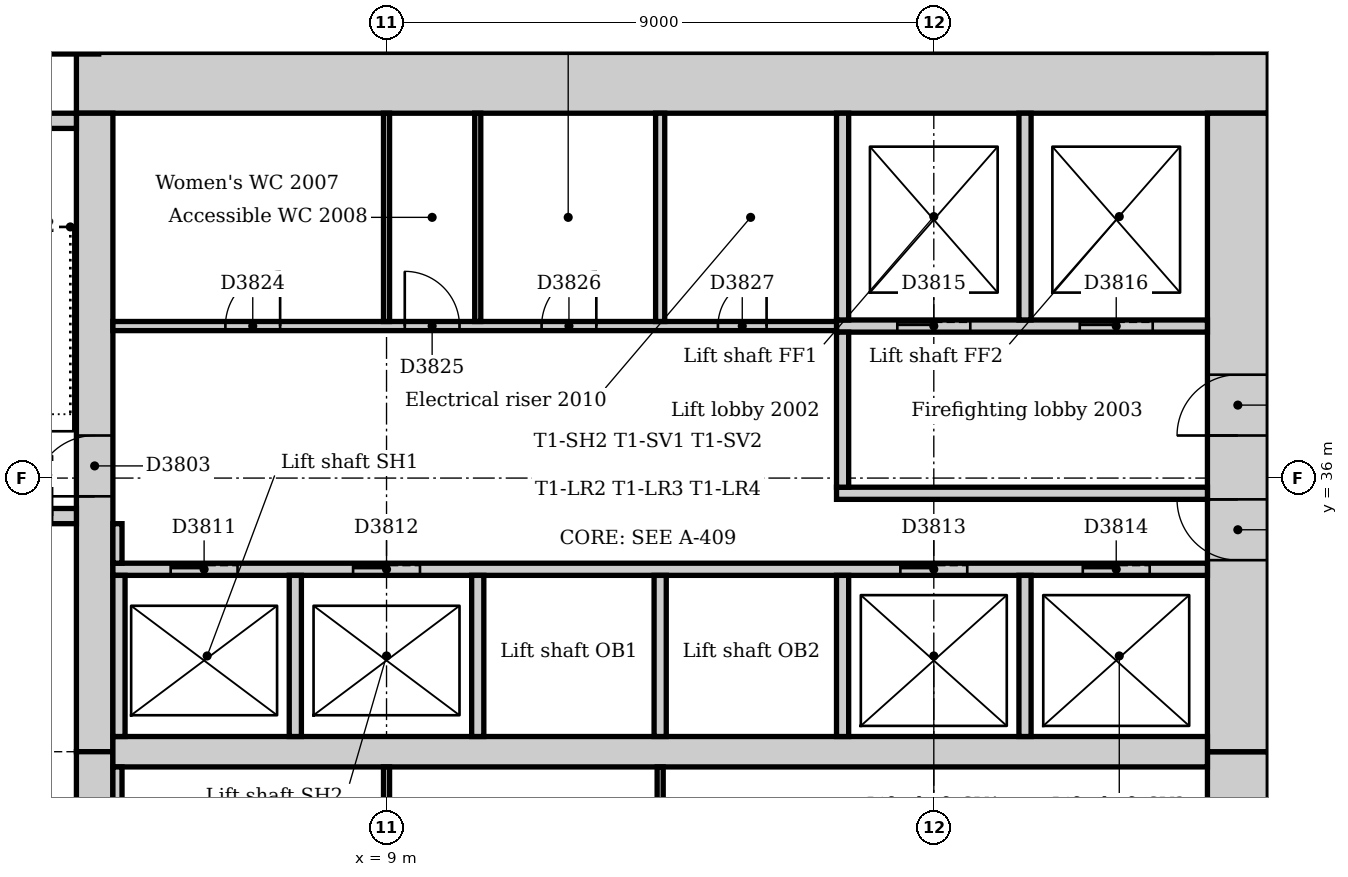
"""IFC4 building model, lengths in metres.
Left out: names, types, materials, properties, quantities, classifications, styles, units other than length and angle.
Written with IfcOpenShell. Run it as: python <this file> out.ifc"""

import sys

from ifc_helpers import new_model, si_unit, direction, frame, frame_2d, origin, origin_2d, place, context, subcontext, project, spatial, rectangle, extrude, element, fill, save


model = new_model("IFC4")
c1 = context("Model", 3, precision=1e-05, world=origin(), true_north=direction((0.0, 1.0)))
c2 = subcontext(c1, "Body", "Model", "MODEL_VIEW")
j1 = project(units=[si_unit("LENGTHUNIT", "METRE"), si_unit("PLANEANGLEUNIT", "RADIAN")], contexts=[c1])
p1 = place(None, origin())
s1 = spatial("IfcSite", under=j1, at=p1, CompositionType="ELEMENT")
p2 = place(p1, origin())
s2 = spatial("IfcBuilding", under=s1, at=p2, CompositionType="ELEMENT")
p3 = place(p2, frame((0.0, 0.0, 87.0)))
s3 = spatial("IfcBuildingStorey", under=s2, at=p3, CompositionType="ELEMENT", Elevation=87.0)
p4 = place(p3, frame((23.5, 42.5, 0.0), z_axis=(0.0, 0.0, 1.0), x_axis=(-1.0, 0.0, 0.0)))
e1 = element("IfcWall", 1, at=p4, inside=s3, PredefinedType="SOLIDWALL", context=c2, shape_type="SweptSolid", body=[
    extrude(rectangle(XDim=19.6, YDim=1.0, at=frame_2d((9.8, 0.0))), origin(), (0.0, 0.0, 1.0), 4.0),
])
p5 = place(p3, frame((23.0, 21.0, 0.0), z_axis=(0.0, 0.0, 1.0), x_axis=(0.0, 1.0, 0.0)))
e2 = element("IfcWall", 2, at=p5, inside=s3, PredefinedType="SOLIDWALL", context=c2, shape_type="SweptSolid", body=[
    extrude(rectangle(XDim=10.5, YDim=1.0, at=frame_2d((5.25, 0.0))), origin(), (0.0, 0.0, 1.0), 4.0),
])
p6 = place(p5, frame((4.35, 0.0, 0.0)))
e3 = element("IfcOpeningElement", 3, at=p6, cuts=e2, PredefinedType="OPENING", context=c2, shape_type="SweptSolid", body=[
    extrude(rectangle(XDim=1.8, YDim=2.1, at=frame_2d((0.9, 1.05))), frame((0.0, 0.51, 0.0), z_axis=(0.0, -1.0, 0.0), x_axis=(1.0, 0.0, 0.0)), (0.0, 0.0, 1.0), 1.02),
])
p7 = place(p3, frame((23.0, 31.5, 0.0), z_axis=(0.0, 0.0, 1.0), x_axis=(0.0, 1.0, 0.0)))
e4 = element("IfcWall", 4, at=p7, inside=s3, PredefinedType="SOLIDWALL", context=c2, shape_type="SweptSolid", body=[
    extrude(rectangle(XDim=10.5, YDim=1.0, at=frame_2d((5.25, 0.0))), origin(), (0.0, 0.0, 1.0), 4.0),
])
p8 = place(p7, frame((3.15, 0.0, 0.0)))
e5 = element("IfcOpeningElement", 5, at=p8, cuts=e4, PredefinedType="OPENING", context=c2, shape_type="SweptSolid", body=[
    extrude(rectangle(XDim=1.0, YDim=2.1, at=frame_2d((0.5, 1.05))), frame((0.0, 0.51, 0.0), z_axis=(0.0, -1.0, 0.0), x_axis=(1.0, 0.0, 0.0)), (0.0, 0.0, 1.0), 1.02),
])
p9 = place(p7, frame((5.2, 0.0, 0.0)))
e6 = element("IfcOpeningElement", 6, at=p9, cuts=e4, PredefinedType="OPENING", context=c2, shape_type="SweptSolid", body=[
    extrude(rectangle(XDim=1.0, YDim=2.1, at=frame_2d((0.5, 1.05))), frame((0.0, 0.51, 0.0), z_axis=(0.0, -1.0, 0.0), x_axis=(1.0, 0.0, 0.0)), (0.0, 0.0, 1.0), 1.02),
])
p10 = place(p3, frame((4.2, 42.0, 0.0), z_axis=(0.0, 0.0, 1.0), x_axis=(0.0, -1.0, 0.0)))
e7 = element("IfcWall", 7, at=p10, inside=s3, PredefinedType="SOLIDWALL", context=c2, shape_type="SweptSolid", body=[
    extrude(rectangle(XDim=10.5, YDim=0.6, at=frame_2d((5.25, 0.0))), origin(), (0.0, 0.0, 1.0), 4.0),
])
p11 = place(p10, frame((5.3, 0.0, 0.0)))
e8 = element("IfcOpeningElement", 8, at=p11, cuts=e7, PredefinedType="OPENING", context=c2, shape_type="SweptSolid", body=[
    extrude(rectangle(XDim=1.0, YDim=2.1, at=frame_2d((0.5, 1.05))), frame((0.0, 0.31, 0.0), z_axis=(0.0, -1.0, 0.0), x_axis=(1.0, 0.0, 0.0)), (0.0, 0.0, 1.0), 0.62),
])
p12 = place(p3, frame((4.2, 31.5, 0.0), z_axis=(0.0, 0.0, 1.0), x_axis=(0.0, -1.0, 0.0)))
e9 = element("IfcWall", 9, at=p12, inside=s3, PredefinedType="SOLIDWALL", context=c2, shape_type="SweptSolid", body=[
    extrude(rectangle(XDim=10.5, YDim=0.6, at=frame_2d((5.25, 0.0))), origin(), (0.0, 0.0, 1.0), 4.0),
])
p13 = place(p12, frame((4.25, 0.0, 0.0)))
e10 = element("IfcOpeningElement", 10, at=p13, cuts=e9, PredefinedType="OPENING", context=c2, shape_type="SweptSolid", body=[
    extrude(rectangle(XDim=1.0, YDim=2.1, at=frame_2d((0.5, 1.05))), frame((0.0, 0.31, 0.0), z_axis=(0.0, -1.0, 0.0), x_axis=(1.0, 0.0, 0.0)), (0.0, 0.0, 1.0), 0.62),
])
p14 = place(p3, frame((4.5, 31.5, 0.0), z_axis=(0.0, 0.0, 1.0), x_axis=(1.0, 0.0, 0.0)))
e11 = element("IfcWall", 11, at=p14, inside=s3, PredefinedType="SOLIDWALL", context=c2, shape_type="SweptSolid", body=[
    extrude(rectangle(XDim=18.0, YDim=0.5, at=frame_2d((9.0, 0.0))), origin(), (0.0, 0.0, 1.0), 4.0),
])
p15 = place(p3, frame((0.36, 35.375, 0.0), z_axis=(0.0, 0.0, 1.0), x_axis=(1.0, 0.0, 0.0)))
e12 = element("IfcWall", 12, at=p15, inside=s3, PredefinedType="SOLIDWALL", context=c2, shape_type="SweptSolid", body=[
    extrude(rectangle(XDim=3.54, YDim=0.25, at=frame_2d((1.77, 0.0))), origin(), (0.0, 0.0, 1.0), 4.0),
])
p16 = place(p15, frame((2.14, 0.0, 0.0)))
e13 = element("IfcOpeningElement", 13, at=p16, cuts=e12, PredefinedType="OPENING", context=c2, shape_type="SweptSolid", body=[
    extrude(rectangle(XDim=1.0, YDim=2.1, at=frame_2d((0.5, 1.05))), frame((0.0, 0.135, 0.0), z_axis=(0.0, -1.0, 0.0), x_axis=(1.0, 0.0, 0.0)), (0.0, 0.0, 1.0), 0.27),
])
p17 = place(p3, frame((3.9, 41.875, 0.0), z_axis=(0.0, 0.0, 1.0), x_axis=(-1.0, 0.0, 0.0)))
e14 = element("IfcWall", 14, at=p17, inside=s3, PredefinedType="SOLIDWALL", context=c2, shape_type="SweptSolid", body=[
    extrude(rectangle(XDim=3.54, YDim=0.25, at=frame_2d((1.77, 0.0))), origin(), (0.0, 0.0, 1.0), 4.0),
])
p18 = place(p3, frame((3.667, 43.574, 0.0), z_axis=(0.0, 0.0, 1.0), x_axis=(1.0, 0.0, 0.0)))
e15 = element("IfcColumn", 15, at=p18, inside=s3, PredefinedType="COLUMN", context=c2, shape_type="SweptSolid", body=[
    extrude(rectangle(XDim=1.2, YDim=1.2, at=origin_2d()), origin(), (0.0, 0.0, 1.0), 3.85),
])
p19 = place(p3, frame((16.4, 35.75, 0.0), z_axis=(0.0, 0.0, 1.0), x_axis=(1.0, 0.0, 0.0)))
e16 = element("IfcWall", 16, at=p19, inside=s3, PredefinedType="PARTITIONING", context=c2, shape_type="SweptSolid", body=[
    extrude(rectangle(XDim=6.1, YDim=0.2, at=frame_2d((3.05, 0.0))), origin(), (0.0, 0.0, 1.0), 3.85),
])
p20 = place(p3, frame((16.4, 38.5, 0.0), z_axis=(0.0, 0.0, 1.0), x_axis=(1.0, 0.0, 0.0)))
e17 = element("IfcWall", 17, at=p20, inside=s3, PredefinedType="PARTITIONING", context=c2, shape_type="SweptSolid", body=[
    extrude(rectangle(XDim=6.1, YDim=0.2, at=frame_2d((3.05, 0.0))), origin(), (0.0, 0.0, 1.0), 3.85),
])
p21 = place(p20, frame((1.0, 0.0, 0.0)))
e18 = element("IfcOpeningElement", 18, at=p21, cuts=e17, PredefinedType="OPENING", context=c2, shape_type="SweptSolid", body=[
    extrude(rectangle(XDim=1.2, YDim=2.1, at=frame_2d((0.6, 1.05))), frame((0.0, 0.11, 0.0), z_axis=(0.0, -1.0, 0.0), x_axis=(1.0, 0.0, 0.0)), (0.0, 0.0, 1.0), 0.22),
])
p22 = place(p20, frame((4.0, 0.0, 0.0)))
e19 = element("IfcOpeningElement", 19, at=p22, cuts=e17, PredefinedType="OPENING", context=c2, shape_type="SweptSolid", body=[
    extrude(rectangle(XDim=1.2, YDim=2.1, at=frame_2d((0.6, 1.05))), frame((0.0, 0.11, 0.0), z_axis=(0.0, -1.0, 0.0), x_axis=(1.0, 0.0, 0.0)), (0.0, 0.0, 1.0), 0.22),
])
p23 = place(p3, frame((16.5, 35.85, 0.0), z_axis=(0.0, 0.0, 1.0), x_axis=(0.0, 1.0, 0.0)))
e20 = element("IfcWall", 20, at=p23, inside=s3, PredefinedType="PARTITIONING", context=c2, shape_type="SweptSolid", body=[
    extrude(rectangle(XDim=2.55, YDim=0.2, at=frame_2d((1.275, 0.0))), origin(), (0.0, 0.0, 1.0), 3.85),
])
p24 = place(p3, frame((4.5, 34.5, 0.0), z_axis=(0.0, 0.0, 1.0), x_axis=(1.0, 0.0, 0.0)))
e21 = element("IfcWall", 21, at=p24, inside=s3, PredefinedType="PARTITIONING", context=c2, shape_type="SweptSolid", body=[
    extrude(rectangle(XDim=18.0, YDim=0.2, at=frame_2d((9.0, 0.0))), origin(), (0.0, 0.0, 1.0), 3.85),
])
p25 = place(p24, frame((0.95, 0.0, 0.0)))
e22 = element("IfcOpeningElement", 22, at=p25, cuts=e21, PredefinedType="OPENING", context=c2, shape_type="SweptSolid", body=[
    extrude(rectangle(XDim=1.1, YDim=2.1, at=frame_2d((0.55, 1.05))), frame((0.0, 0.11, 0.0), z_axis=(0.0, -1.0, 0.0), x_axis=(1.0, 0.0, 0.0)), (0.0, 0.0, 1.0), 0.22),
])
p26 = place(p24, frame((3.95, 0.0, 0.0)))
e23 = element("IfcOpeningElement", 23, at=p26, cuts=e21, PredefinedType="OPENING", context=c2, shape_type="SweptSolid", body=[
    extrude(rectangle(XDim=1.1, YDim=2.1, at=frame_2d((0.55, 1.05))), frame((0.0, 0.11, 0.0), z_axis=(0.0, -1.0, 0.0), x_axis=(1.0, 0.0, 0.0)), (0.0, 0.0, 1.0), 0.22),
])
p27 = place(p24, frame((12.95, 0.0, 0.0)))
e24 = element("IfcOpeningElement", 24, at=p27, cuts=e21, PredefinedType="OPENING", context=c2, shape_type="SweptSolid", body=[
    extrude(rectangle(XDim=1.1, YDim=2.1, at=frame_2d((0.55, 1.05))), frame((0.0, 0.11, 0.0), z_axis=(0.0, -1.0, 0.0), x_axis=(1.0, 0.0, 0.0)), (0.0, 0.0, 1.0), 0.22),
])
p28 = place(p24, frame((15.95, 0.0, 0.0)))
e25 = element("IfcOpeningElement", 25, at=p28, cuts=e21, PredefinedType="OPENING", context=c2, shape_type="SweptSolid", body=[
    extrude(rectangle(XDim=1.1, YDim=2.1, at=frame_2d((0.55, 1.05))), frame((0.0, 0.11, 0.0), z_axis=(0.0, -1.0, 0.0), x_axis=(1.0, 0.0, 0.0)), (0.0, 0.0, 1.0), 0.22),
])
for number, where, z_axis, x_axis in (
    (26, (16.5, 38.6, 0.0), (0.0, 0.0, 1.0), (0.0, 1.0, 0.0)),
    (27, (19.5, 38.6, 0.0), (0.0, 0.0, 1.0), (0.0, 1.0, 0.0)),
):
    element("IfcWall", number, at=place(p3, frame(where, z_axis=z_axis, x_axis=x_axis)), inside=s3, PredefinedType="PARTITIONING", context=c2, shape_type="SweptSolid", body=[
        extrude(rectangle(XDim=3.4, YDim=0.2, at=frame_2d((1.7, 0.0))), origin(), (0.0, 0.0, 1.0), 3.85),
    ])
for number, where, z_axis, x_axis in (
    (28, (4.6, 31.75, 0.0), (0.0, 0.0, 1.0), (0.0, 1.0, 0.0)),
    (29, (7.5, 31.75, 0.0), (0.0, 0.0, 1.0), (0.0, 1.0, 0.0)),
    (30, (10.5, 31.75, 0.0), (0.0, 0.0, 1.0), (0.0, 1.0, 0.0)),
    (31, (13.5, 31.75, 0.0), (0.0, 0.0, 1.0), (0.0, 1.0, 0.0)),
    (32, (16.5, 31.75, 0.0), (0.0, 0.0, 1.0), (0.0, 1.0, 0.0)),
    (33, (19.5, 31.75, 0.0), (0.0, 0.0, 1.0), (0.0, 1.0, 0.0)),
):
    element("IfcWall", number, at=place(p3, frame(where, z_axis=z_axis, x_axis=x_axis)), inside=s3, PredefinedType="PARTITIONING", context=c2, shape_type="SweptSolid", body=[
        extrude(rectangle(XDim=2.65, YDim=0.2, at=frame_2d((1.325, 0.0))), origin(), (0.0, 0.0, 1.0), 3.85),
    ])
p29 = place(p3, frame((4.5, 38.5, 0.0), z_axis=(0.0, 0.0, 1.0), x_axis=(1.0, 0.0, 0.0)))
e34 = element("IfcWall", 34, at=p29, inside=s3, PredefinedType="PARTITIONING", context=c2, shape_type="SweptSolid", body=[
    extrude(rectangle(XDim=11.9, YDim=0.15, at=frame_2d((5.95, 0.0))), origin(), (0.0, 0.0, 1.0), 3.85),
])
p30 = place(p29, frame((1.85, 0.0, 0.0)))
e35 = element("IfcOpeningElement", 35, at=p30, cuts=e34, PredefinedType="OPENING", context=c2, shape_type="SweptSolid", body=[
    extrude(rectangle(XDim=0.9, YDim=2.1, at=frame_2d((0.45, 1.05))), frame((0.0, 0.085, 0.0), z_axis=(0.0, -1.0, 0.0), x_axis=(1.0, 0.0, 0.0)), (0.0, 0.0, 1.0), 0.17),
])
p31 = place(p29, frame((4.8, 0.0, 0.0)))
e36 = element("IfcOpeningElement", 36, at=p31, cuts=e34, PredefinedType="OPENING", context=c2, shape_type="SweptSolid", body=[
    extrude(rectangle(XDim=0.9, YDim=2.1, at=frame_2d((0.45, 1.05))), frame((0.0, 0.085, 0.0), z_axis=(0.0, -1.0, 0.0), x_axis=(1.0, 0.0, 0.0)), (0.0, 0.0, 1.0), 0.17),
])
p32 = place(p29, frame((7.05, 0.0, 0.0)))
e37 = element("IfcOpeningElement", 37, at=p32, cuts=e34, PredefinedType="OPENING", context=c2, shape_type="SweptSolid", body=[
    extrude(rectangle(XDim=0.9, YDim=2.1, at=frame_2d((0.45, 1.05))), frame((0.0, 0.085, 0.0), z_axis=(0.0, -1.0, 0.0), x_axis=(1.0, 0.0, 0.0)), (0.0, 0.0, 1.0), 0.17),
])
p33 = place(p29, frame((9.95, 0.0, 0.0)))
e38 = element("IfcOpeningElement", 38, at=p33, cuts=e34, PredefinedType="OPENING", context=c2, shape_type="SweptSolid", body=[
    extrude(rectangle(XDim=0.8, YDim=2.1, at=frame_2d((0.4, 1.05))), frame((0.0, 0.085, 0.0), z_axis=(0.0, -1.0, 0.0), x_axis=(1.0, 0.0, 0.0)), (0.0, 0.0, 1.0), 0.17),
])
p34 = place(p3, frame((4.575, 28.575, 0.0), z_axis=(0.0, 0.0, 1.0), x_axis=(0.0, 1.0, 0.0)))
e39 = element("IfcWall", 39, at=p34, inside=s3, PredefinedType="PARTITIONING", context=c2, shape_type="SweptSolid", body=[
    extrude(rectangle(XDim=2.675, YDim=0.15, at=frame_2d((1.337, 0.0))), origin(), (0.0, 0.0, 1.0), 3.85),
])
p35 = place(p3, frame((4.575, 34.6, 0.0), z_axis=(0.0, 0.0, 1.0), x_axis=(0.0, 1.0, 0.0)))
e40 = element("IfcWall", 40, at=p35, inside=s3, PredefinedType="PARTITIONING", context=c2, shape_type="SweptSolid", body=[
    extrude(rectangle(XDim=0.65, YDim=0.15, at=frame_2d((0.325, 0.0))), origin(), (0.0, 0.0, 1.0), 3.85),
])
p36 = place(p3, frame((13.5, 38.575, 0.0), z_axis=(0.0, 0.0, 1.0), x_axis=(0.0, 1.0, 0.0)))
e41 = element("IfcWall", 41, at=p36, inside=s3, PredefinedType="PARTITIONING", context=c2, shape_type="SweptSolid", body=[
    extrude(rectangle(XDim=3.425, YDim=0.15, at=frame_2d((1.712, 0.0))), origin(), (0.0, 0.0, 1.0), 3.85),
])
for number, where, z_axis, x_axis in (
    (42, (9.0, 38.575, 0.0), (0.0, 0.0, 1.0), (0.0, 1.0, 0.0)),
    (43, (10.5, 38.575, 0.0), (0.0, 0.0, 1.0), (0.0, 1.0, 0.0)),
):
    element("IfcWall", number, at=place(p3, frame(where, z_axis=z_axis, x_axis=x_axis)), inside=s3, PredefinedType="PARTITIONING", context=c2, shape_type="SweptSolid", body=[
        extrude(rectangle(XDim=3.425, YDim=0.1, at=frame_2d((1.712, 0.0))), origin(), (0.0, 0.0, 1.0), 3.85),
    ])
for number, where, z_axis, x_axis in (
    (44, (9.0, 28.575, 0.0), (0.0, 0.0, 1.0), (0.0, 1.0, 0.0)),
    (45, (13.5, 28.575, 0.0), (0.0, 0.0, 1.0), (0.0, 1.0, 0.0)),
):
    element("IfcWall", number, at=place(p3, frame(where, z_axis=z_axis, x_axis=x_axis)), inside=s3, PredefinedType="PARTITIONING", context=c2, shape_type="SweptSolid", body=[
        extrude(rectangle(XDim=2.675, YDim=0.1, at=frame_2d((1.337, 0.0))), origin(), (0.0, 0.0, 1.0), 3.85),
    ])
p37 = place(p11, frame((1.0, 0.0, 0.0), z_axis=(0.0, 0.0, 1.0), x_axis=(-1.0, 0.0, 0.0)))
e46 = element("IfcDoor", 46, at=p37, inside=s3, OperationType="SINGLE_SWING_LEFT", PredefinedType="DOOR", context=c2, shape_type="SweptSolid", body=[
    extrude(rectangle(XDim=1.0, YDim=2.1, at=frame_2d((0.5, 1.05))), frame((0.0, 0.025, 0.0), z_axis=(0.0, -1.0, 0.0), x_axis=(1.0, 0.0, 0.0)), (0.0, 0.0, 1.0), 0.05),
])
fill(e8, e46)
p38 = place(p25, origin())
e47 = element("IfcDoor", 47, at=p38, inside=s3, OperationType="SLIDING_TO_LEFT", PredefinedType="DOOR", context=c2, shape_type="SweptSolid", body=[
    extrude(rectangle(XDim=1.1, YDim=2.1, at=frame_2d((0.55, 1.05))), frame((0.0, 0.025, 0.0), z_axis=(0.0, -1.0, 0.0), x_axis=(1.0, 0.0, 0.0)), (0.0, 0.0, 1.0), 0.05),
])
fill(e22, e47)
p39 = place(p26, origin())
e48 = element("IfcDoor", 48, at=p39, inside=s3, OperationType="SLIDING_TO_LEFT", PredefinedType="DOOR", context=c2, shape_type="SweptSolid", body=[
    extrude(rectangle(XDim=1.1, YDim=2.1, at=frame_2d((0.55, 1.05))), frame((0.0, 0.025, 0.0), z_axis=(0.0, -1.0, 0.0), x_axis=(1.0, 0.0, 0.0)), (0.0, 0.0, 1.0), 0.05),
])
fill(e23, e48)
p40 = place(p27, origin())
e49 = element("IfcDoor", 49, at=p40, inside=s3, OperationType="SLIDING_TO_LEFT", PredefinedType="DOOR", context=c2, shape_type="SweptSolid", body=[
    extrude(rectangle(XDim=1.1, YDim=2.1, at=frame_2d((0.55, 1.05))), frame((0.0, 0.025, 0.0), z_axis=(0.0, -1.0, 0.0), x_axis=(1.0, 0.0, 0.0)), (0.0, 0.0, 1.0), 0.05),
])
fill(e24, e49)
p41 = place(p28, origin())
e50 = element("IfcDoor", 50, at=p41, inside=s3, OperationType="SLIDING_TO_LEFT", PredefinedType="DOOR", context=c2, shape_type="SweptSolid", body=[
    extrude(rectangle(XDim=1.1, YDim=2.1, at=frame_2d((0.55, 1.05))), frame((0.0, 0.025, 0.0), z_axis=(0.0, -1.0, 0.0), x_axis=(1.0, 0.0, 0.0)), (0.0, 0.0, 1.0), 0.05),
])
fill(e25, e50)
p42 = place(p21, origin())
e51 = element("IfcDoor", 51, at=p42, inside=s3, OperationType="SLIDING_TO_LEFT", PredefinedType="DOOR", context=c2, shape_type="SweptSolid", body=[
    extrude(rectangle(XDim=1.2, YDim=2.1, at=frame_2d((0.6, 1.05))), frame((0.0, 0.025, 0.0), z_axis=(0.0, -1.0, 0.0), x_axis=(1.0, 0.0, 0.0)), (0.0, 0.0, 1.0), 0.05),
])
fill(e18, e51)
p43 = place(p22, origin())
e52 = element("IfcDoor", 52, at=p43, inside=s3, OperationType="SLIDING_TO_LEFT", PredefinedType="DOOR", context=c2, shape_type="SweptSolid", body=[
    extrude(rectangle(XDim=1.2, YDim=2.1, at=frame_2d((0.6, 1.05))), frame((0.0, 0.025, 0.0), z_axis=(0.0, -1.0, 0.0), x_axis=(1.0, 0.0, 0.0)), (0.0, 0.0, 1.0), 0.05),
])
fill(e19, e52)
p44 = place(p8, origin())
e53 = element("IfcDoor", 53, at=p44, inside=s3, OperationType="SINGLE_SWING_RIGHT", PredefinedType="DOOR", context=c2, shape_type="SweptSolid", body=[
    extrude(rectangle(XDim=1.0, YDim=2.1, at=frame_2d((0.5, 1.05))), frame((0.0, 0.025, 0.0), z_axis=(0.0, -1.0, 0.0), x_axis=(1.0, 0.0, 0.0)), (0.0, 0.0, 1.0), 0.05),
])
fill(e5, e53)
p45 = place(p9, origin())
e54 = element("IfcDoor", 54, at=p45, inside=s3, OperationType="SINGLE_SWING_LEFT", PredefinedType="DOOR", context=c2, shape_type="SweptSolid", body=[
    extrude(rectangle(XDim=1.0, YDim=2.1, at=frame_2d((0.5, 1.05))), frame((0.0, 0.025, 0.0), z_axis=(0.0, -1.0, 0.0), x_axis=(1.0, 0.0, 0.0)), (0.0, 0.0, 1.0), 0.05),
])
fill(e6, e54)
p46 = place(p30, origin())
e55 = element("IfcDoor", 55, at=p46, inside=s3, OperationType="SINGLE_SWING_RIGHT", PredefinedType="DOOR", context=c2, shape_type="SweptSolid", body=[
    extrude(rectangle(XDim=0.9, YDim=2.1, at=frame_2d((0.45, 1.05))), frame((0.0, 0.025, 0.0), z_axis=(0.0, -1.0, 0.0), x_axis=(1.0, 0.0, 0.0)), (0.0, 0.0, 1.0), 0.05),
])
fill(e35, e55)
p47 = place(p31, origin())
e56 = element("IfcDoor", 56, at=p47, inside=s3, OperationType="SINGLE_SWING_LEFT", PredefinedType="DOOR", context=c2, shape_type="SweptSolid", body=[
    extrude(rectangle(XDim=0.9, YDim=2.1, at=frame_2d((0.45, 1.05))), frame((0.0, 0.025, 0.0), z_axis=(0.0, -1.0, 0.0), x_axis=(1.0, 0.0, 0.0)), (0.0, 0.0, 1.0), 0.05),
])
fill(e36, e56)
p48 = place(p32, origin())
e57 = element("IfcDoor", 57, at=p48, inside=s3, OperationType="SINGLE_SWING_RIGHT", PredefinedType="DOOR", context=c2, shape_type="SweptSolid", body=[
    extrude(rectangle(XDim=0.9, YDim=2.1, at=frame_2d((0.45, 1.05))), frame((0.0, 0.025, 0.0), z_axis=(0.0, -1.0, 0.0), x_axis=(1.0, 0.0, 0.0)), (0.0, 0.0, 1.0), 0.05),
])
fill(e37, e57)
p49 = place(p33, origin())
e58 = element("IfcDoor", 58, at=p49, inside=s3, OperationType="SINGLE_SWING_RIGHT", PredefinedType="DOOR", context=c2, shape_type="SweptSolid", body=[
    extrude(rectangle(XDim=0.8, YDim=2.1, at=frame_2d((0.4, 1.05))), frame((0.0, 0.025, 0.0), z_axis=(0.0, -1.0, 0.0), x_axis=(1.0, 0.0, 0.0)), (0.0, 0.0, 1.0), 0.05),
])
fill(e38, e58)
save(model, sys.argv[1])
